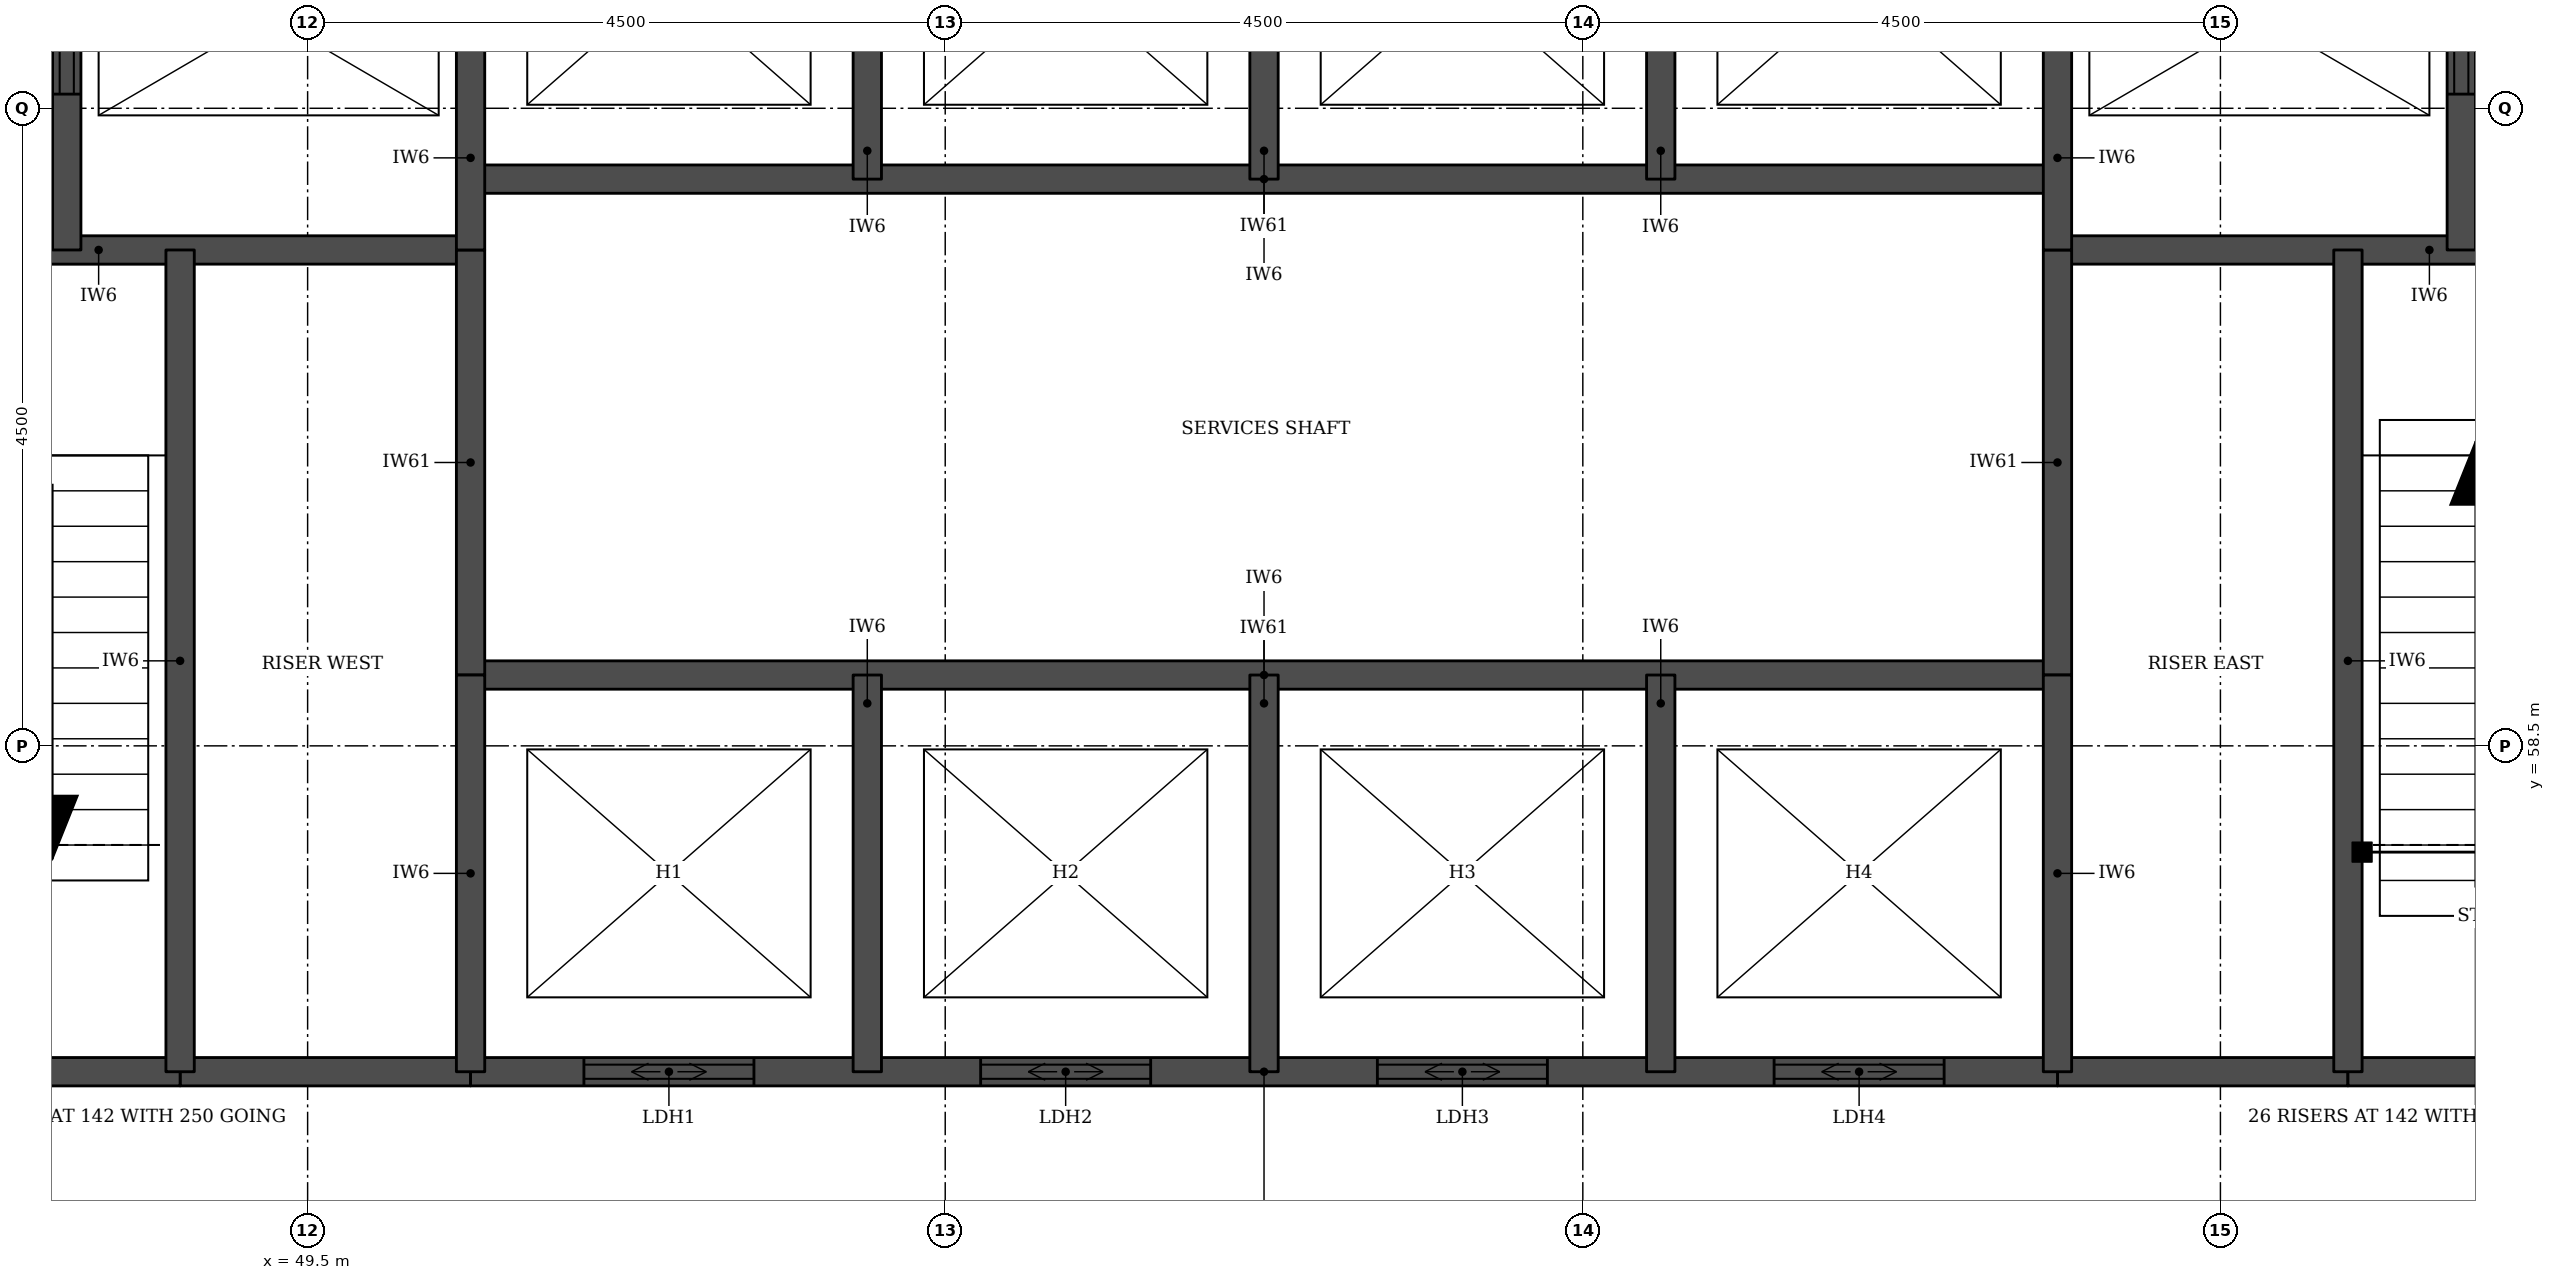
"""IFC4 building model, lengths in metres.
Left out: names, types, materials, properties, quantities, classifications, styles, units other than length and angle.
Written with IfcOpenShell. Run it as: python <this file> out.ifc"""

import sys

from ifc_helpers import new_model, si_unit, direction, frame, frame_2d, origin, place, context, subcontext, project, spatial, rectangle, extrude, element, fill, save


model = new_model("IFC4")
c1 = context("Model", 3, precision=1e-05, world=origin(), true_north=direction((0.0, 1.0)))
c2 = subcontext(c1, "Body", "Model", "MODEL_VIEW")
j1 = project(units=[si_unit("LENGTHUNIT", "METRE"), si_unit("PLANEANGLEUNIT", "RADIAN")], contexts=[c1])
p1 = place(None, origin())
s1 = spatial("IfcSite", under=j1, at=p1, CompositionType="ELEMENT")
p2 = place(p1, origin())
s2 = spatial("IfcBuilding", under=s1, at=p2, CompositionType="ELEMENT")
p3 = place(p2, frame((0.0, 0.0, 169.9)))
s3 = spatial("IfcBuildingStorey", under=s2, at=p3, CompositionType="ELEMENT", Elevation=169.9)
for number, where, z_axis, x_axis in (
    (1, (48.6, 56.2, 0.0), (0.0, 0.0, 1.0), (1.0, 0.0, 0.0)),
    (2, (61.85, 56.2, 0.0), (0.0, 0.0, 1.0), (1.0, 0.0, 0.0)),
):
    element("IfcWall", number, at=place(p3, frame(where, z_axis=z_axis, x_axis=x_axis)), inside=s3, PredefinedType="SOLIDWALL", context=c2, shape_type="SweptSolid", body=[
        extrude(rectangle(XDim=2.05, YDim=0.2, at=frame_2d((1.025, 0.0))), origin(), (0.0, 0.0, 1.0), 3.55),
    ])
p4 = place(p3, frame((45.4, 56.2, 0.0), z_axis=(0.0, 0.0, 1.0), x_axis=(1.0, 0.0, 0.0)))
e3 = element("IfcWall", 3, at=p4, inside=s3, PredefinedType="SOLIDWALL", context=c2, shape_type="SweptSolid", body=[
    extrude(rectangle(XDim=3.2, YDim=0.2, at=frame_2d((1.6, 0.0))), origin(), (0.0, 0.0, 1.0), 3.55),
])
p5 = place(p3, frame((50.65, 56.2, 0.0), z_axis=(0.0, 0.0, 1.0), x_axis=(1.0, 0.0, 0.0)))
e4 = element("IfcWall", 4, at=p5, inside=s3, PredefinedType="SOLIDWALL", context=c2, shape_type="SweptSolid", body=[
    extrude(rectangle(XDim=11.2, YDim=0.2, at=frame_2d((5.6, 0.0))), origin(), (0.0, 0.0, 1.0), 3.55),
])
p6 = place(p5, frame((0.8, 0.0, 0.0)))
e5 = element("IfcOpeningElement", 5, at=p6, cuts=e4, PredefinedType="OPENING", context=c2, shape_type="SweptSolid", body=[
    extrude(rectangle(XDim=1.2, YDim=2.1, at=frame_2d((0.6, 1.05))), frame((0.0, 0.11, 0.0), z_axis=(0.0, -1.0, 0.0), x_axis=(1.0, 0.0, 0.0)), (0.0, 0.0, 1.0), 0.22),
])
p7 = place(p5, frame((3.6, 0.0, 0.0)))
e6 = element("IfcOpeningElement", 6, at=p7, cuts=e4, PredefinedType="OPENING", context=c2, shape_type="SweptSolid", body=[
    extrude(rectangle(XDim=1.2, YDim=2.1, at=frame_2d((0.6, 1.05))), frame((0.0, 0.11, 0.0), z_axis=(0.0, -1.0, 0.0), x_axis=(1.0, 0.0, 0.0)), (0.0, 0.0, 1.0), 0.22),
])
p8 = place(p5, frame((6.4, 0.0, 0.0)))
e7 = element("IfcOpeningElement", 7, at=p8, cuts=e4, PredefinedType="OPENING", context=c2, shape_type="SweptSolid", body=[
    extrude(rectangle(XDim=1.2, YDim=2.1, at=frame_2d((0.6, 1.05))), frame((0.0, 0.11, 0.0), z_axis=(0.0, -1.0, 0.0), x_axis=(1.0, 0.0, 0.0)), (0.0, 0.0, 1.0), 0.22),
])
p9 = place(p5, frame((9.2, 0.0, 0.0)))
e8 = element("IfcOpeningElement", 8, at=p9, cuts=e4, PredefinedType="OPENING", context=c2, shape_type="SweptSolid", body=[
    extrude(rectangle(XDim=1.2, YDim=2.1, at=frame_2d((0.6, 1.05))), frame((0.0, 0.11, 0.0), z_axis=(0.0, -1.0, 0.0), x_axis=(1.0, 0.0, 0.0)), (0.0, 0.0, 1.0), 0.22),
])
p10 = place(p3, frame((63.9, 56.2, 0.0), z_axis=(0.0, 0.0, 1.0), x_axis=(1.0, 0.0, 0.0)))
e9 = element("IfcWall", 9, at=p10, inside=s3, PredefinedType="SOLIDWALL", context=c2, shape_type="SweptSolid", body=[
    extrude(rectangle(XDim=3.2, YDim=0.2, at=frame_2d((1.6, 0.0))), origin(), (0.0, 0.0, 1.0), 3.55),
])
p11 = place(p3, frame((50.65, 59.0, 0.0), z_axis=(0.0, 0.0, 1.0), x_axis=(1.0, 0.0, 0.0)))
e10 = element("IfcWall", 10, at=p11, inside=s3, PredefinedType="SOLIDWALL", context=c2, shape_type="SweptSolid", body=[
    extrude(rectangle(XDim=11.2, YDim=0.2, at=frame_2d((5.6, 0.0))), origin(), (0.0, 0.0, 1.0), 3.7),
])
for number, where, z_axis, x_axis in (
    (11, (45.4, 62.0, 0.0), (0.0, 0.0, 1.0), (1.0, 0.0, 0.0)),
    (12, (61.85, 62.0, 0.0), (0.0, 0.0, 1.0), (1.0, 0.0, 0.0)),
):
    element("IfcWall", number, at=place(p3, frame(where, z_axis=z_axis, x_axis=x_axis)), inside=s3, PredefinedType="SOLIDWALL", context=c2, shape_type="SweptSolid", body=[
        extrude(rectangle(XDim=5.25, YDim=0.2, at=frame_2d((2.625, 0.0))), origin(), (0.0, 0.0, 1.0), 3.55),
    ])
p12 = place(p3, frame((50.65, 62.5, 0.0), z_axis=(0.0, 0.0, 1.0), x_axis=(1.0, 0.0, 0.0)))
e13 = element("IfcWall", 13, at=p12, inside=s3, PredefinedType="SOLIDWALL", context=c2, shape_type="SweptSolid", body=[
    extrude(rectangle(XDim=11.2, YDim=0.2, at=frame_2d((5.6, 0.0))), origin(), (0.0, 0.0, 1.0), 3.7),
])
p13 = place(p3, frame((47.8, 62.0, 0.0), z_axis=(0.0, 0.0, 1.0), x_axis=(0.0, 1.0, 0.0)))
e14 = element("IfcWall", 14, at=p13, inside=s3, PredefinedType="SOLIDWALL", context=c2, shape_type="SweptSolid", body=[
    extrude(rectangle(XDim=3.3, YDim=0.2, at=frame_2d((1.65, 0.0))), origin(), (0.0, 0.0, 1.0), 3.55),
])
p14 = place(p13, frame((1.1, 0.0, 0.0)))
e15 = element("IfcOpeningElement", 15, at=p14, cuts=e14, PredefinedType="OPENING", context=c2, shape_type="SweptSolid", body=[
    extrude(rectangle(XDim=1.1, YDim=2.1, at=frame_2d((0.55, 1.05))), frame((0.0, 0.11, 0.0), z_axis=(0.0, -1.0, 0.0), x_axis=(1.0, 0.0, 0.0)), (0.0, 0.0, 1.0), 0.22),
])
p15 = place(p3, frame((48.6, 56.2, 0.0), z_axis=(0.0, 0.0, 1.0), x_axis=(0.0, 1.0, 0.0)))
e16 = element("IfcWall", 16, at=p15, inside=s3, PredefinedType="SOLIDWALL", context=c2, shape_type="SweptSolid", body=[
    extrude(rectangle(XDim=5.8, YDim=0.2, at=frame_2d((2.9, 0.0))), origin(), (0.0, 0.0, 1.0), 3.55),
])
p16 = place(p3, frame((50.65, 59.0, 0.0), z_axis=(0.0, 0.0, 1.0), x_axis=(0.0, 1.0, 0.0)))
e17 = element("IfcWall", 17, at=p16, inside=s3, PredefinedType="SOLIDWALL", context=c2, shape_type="SweptSolid", body=[
    extrude(rectangle(XDim=3.0, YDim=0.2, at=frame_2d((1.5, 0.0))), origin(), (0.0, 0.0, 1.0), 3.7),
])
p17 = place(p3, frame((50.65, 56.2, 0.0), z_axis=(0.0, 0.0, 1.0), x_axis=(0.0, 1.0, 0.0)))
e18 = element("IfcWall", 18, at=p17, inside=s3, PredefinedType="SOLIDWALL", context=c2, shape_type="SweptSolid", body=[
    extrude(rectangle(XDim=2.8, YDim=0.2, at=frame_2d((1.4, 0.0))), origin(), (0.0, 0.0, 1.0), 3.55),
])
p18 = place(p3, frame((50.65, 62.0, 0.0), z_axis=(0.0, 0.0, 1.0), x_axis=(0.0, 1.0, 0.0)))
e19 = element("IfcWall", 19, at=p18, inside=s3, PredefinedType="SOLIDWALL", context=c2, shape_type="SweptSolid", body=[
    extrude(rectangle(XDim=3.3, YDim=0.2, at=frame_2d((1.65, 0.0))), origin(), (0.0, 0.0, 1.0), 3.55),
])
for number, where, z_axis, x_axis in (
    (20, (53.45, 56.2, 0.0), (0.0, 0.0, 1.0), (0.0, 1.0, 0.0)),
    (21, (53.45, 62.5, 0.0), (0.0, 0.0, 1.0), (0.0, 1.0, 0.0)),
    (22, (56.25, 56.2, 0.0), (0.0, 0.0, 1.0), (0.0, 1.0, 0.0)),
    (23, (56.25, 62.5, 0.0), (0.0, 0.0, 1.0), (0.0, 1.0, 0.0)),
    (24, (59.05, 56.2, 0.0), (0.0, 0.0, 1.0), (0.0, 1.0, 0.0)),
    (25, (59.05, 62.5, 0.0), (0.0, 0.0, 1.0), (0.0, 1.0, 0.0)),
):
    element("IfcWall", number, at=place(p3, frame(where, z_axis=z_axis, x_axis=x_axis)), inside=s3, PredefinedType="SOLIDWALL", context=c2, shape_type="SweptSolid", body=[
        extrude(rectangle(XDim=2.8, YDim=0.2, at=frame_2d((1.4, 0.0))), origin(), (0.0, 0.0, 1.0), 3.55),
    ])
p19 = place(p3, frame((61.85, 59.0, 0.0), z_axis=(0.0, 0.0, 1.0), x_axis=(0.0, 1.0, 0.0)))
e26 = element("IfcWall", 26, at=p19, inside=s3, PredefinedType="SOLIDWALL", context=c2, shape_type="SweptSolid", body=[
    extrude(rectangle(XDim=3.0, YDim=0.2, at=frame_2d((1.5, 0.0))), origin(), (0.0, 0.0, 1.0), 3.7),
])
p20 = place(p3, frame((61.85, 56.2, 0.0), z_axis=(0.0, 0.0, 1.0), x_axis=(0.0, 1.0, 0.0)))
e27 = element("IfcWall", 27, at=p20, inside=s3, PredefinedType="SOLIDWALL", context=c2, shape_type="SweptSolid", body=[
    extrude(rectangle(XDim=2.8, YDim=0.2, at=frame_2d((1.4, 0.0))), origin(), (0.0, 0.0, 1.0), 3.55),
])
p21 = place(p3, frame((61.85, 62.0, 0.0), z_axis=(0.0, 0.0, 1.0), x_axis=(0.0, 1.0, 0.0)))
e28 = element("IfcWall", 28, at=p21, inside=s3, PredefinedType="SOLIDWALL", context=c2, shape_type="SweptSolid", body=[
    extrude(rectangle(XDim=3.3, YDim=0.2, at=frame_2d((1.65, 0.0))), origin(), (0.0, 0.0, 1.0), 3.55),
])
p22 = place(p3, frame((63.9, 56.2, 0.0), z_axis=(0.0, 0.0, 1.0), x_axis=(0.0, 1.0, 0.0)))
e29 = element("IfcWall", 29, at=p22, inside=s3, PredefinedType="SOLIDWALL", context=c2, shape_type="SweptSolid", body=[
    extrude(rectangle(XDim=5.8, YDim=0.2, at=frame_2d((2.9, 0.0))), origin(), (0.0, 0.0, 1.0), 3.55),
])
p23 = place(p3, frame((64.7, 62.0, 0.0), z_axis=(0.0, 0.0, 1.0), x_axis=(0.0, 1.0, 0.0)))
e30 = element("IfcWall", 30, at=p23, inside=s3, PredefinedType="SOLIDWALL", context=c2, shape_type="SweptSolid", body=[
    extrude(rectangle(XDim=3.3, YDim=0.2, at=frame_2d((1.65, 0.0))), origin(), (0.0, 0.0, 1.0), 3.55),
])
p24 = place(p23, frame((1.1, 0.0, 0.0)))
e31 = element("IfcOpeningElement", 31, at=p24, cuts=e30, PredefinedType="OPENING", context=c2, shape_type="SweptSolid", body=[
    extrude(rectangle(XDim=1.1, YDim=2.1, at=frame_2d((0.55, 1.05))), frame((0.0, 0.11, 0.0), z_axis=(0.0, -1.0, 0.0), x_axis=(1.0, 0.0, 0.0)), (0.0, 0.0, 1.0), 0.22),
])
p25 = place(p6, origin())
e32 = element("IfcDoor", 32, at=p25, inside=s3, OperationType="DOUBLE_DOOR_SLIDING", PredefinedType="DOOR", context=c2, shape_type="SweptSolid", body=[
    extrude(rectangle(XDim=1.2, YDim=2.1, at=frame_2d((0.6, 1.05))), frame((0.0, 0.025, 0.0), z_axis=(0.0, -1.0, 0.0), x_axis=(1.0, 0.0, 0.0)), (0.0, 0.0, 1.0), 0.05),
])
fill(e5, e32)
p26 = place(p7, origin())
e33 = element("IfcDoor", 33, at=p26, inside=s3, OperationType="DOUBLE_DOOR_SLIDING", PredefinedType="DOOR", context=c2, shape_type="SweptSolid", body=[
    extrude(rectangle(XDim=1.2, YDim=2.1, at=frame_2d((0.6, 1.05))), frame((0.0, 0.025, 0.0), z_axis=(0.0, -1.0, 0.0), x_axis=(1.0, 0.0, 0.0)), (0.0, 0.0, 1.0), 0.05),
])
fill(e6, e33)
p27 = place(p8, origin())
e34 = element("IfcDoor", 34, at=p27, inside=s3, OperationType="DOUBLE_DOOR_SLIDING", PredefinedType="DOOR", context=c2, shape_type="SweptSolid", body=[
    extrude(rectangle(XDim=1.2, YDim=2.1, at=frame_2d((0.6, 1.05))), frame((0.0, 0.025, 0.0), z_axis=(0.0, -1.0, 0.0), x_axis=(1.0, 0.0, 0.0)), (0.0, 0.0, 1.0), 0.05),
])
fill(e7, e34)
p28 = place(p9, origin())
e35 = element("IfcDoor", 35, at=p28, inside=s3, OperationType="DOUBLE_DOOR_SLIDING", PredefinedType="DOOR", context=c2, shape_type="SweptSolid", body=[
    extrude(rectangle(XDim=1.2, YDim=2.1, at=frame_2d((0.6, 1.05))), frame((0.0, 0.025, 0.0), z_axis=(0.0, -1.0, 0.0), x_axis=(1.0, 0.0, 0.0)), (0.0, 0.0, 1.0), 0.05),
])
fill(e8, e35)
p29 = place(p14, origin())
e36 = element("IfcDoor", 36, at=p29, inside=s3, OperationType="DOUBLE_DOOR_SLIDING", PredefinedType="DOOR", context=c2, shape_type="SweptSolid", body=[
    extrude(rectangle(XDim=1.1, YDim=2.1, at=frame_2d((0.55, 1.05))), frame((0.0, 0.025, 0.0), z_axis=(0.0, -1.0, 0.0), x_axis=(1.0, 0.0, 0.0)), (0.0, 0.0, 1.0), 0.05),
])
fill(e15, e36)
p30 = place(p24, origin())
e37 = element("IfcDoor", 37, at=p30, inside=s3, OperationType="DOUBLE_DOOR_SLIDING", PredefinedType="DOOR", context=c2, shape_type="SweptSolid", body=[
    extrude(rectangle(XDim=1.1, YDim=2.1, at=frame_2d((0.55, 1.05))), frame((0.0, 0.025, 0.0), z_axis=(0.0, -1.0, 0.0), x_axis=(1.0, 0.0, 0.0)), (0.0, 0.0, 1.0), 0.05),
])
fill(e31, e37)
save(model, sys.argv[1])
